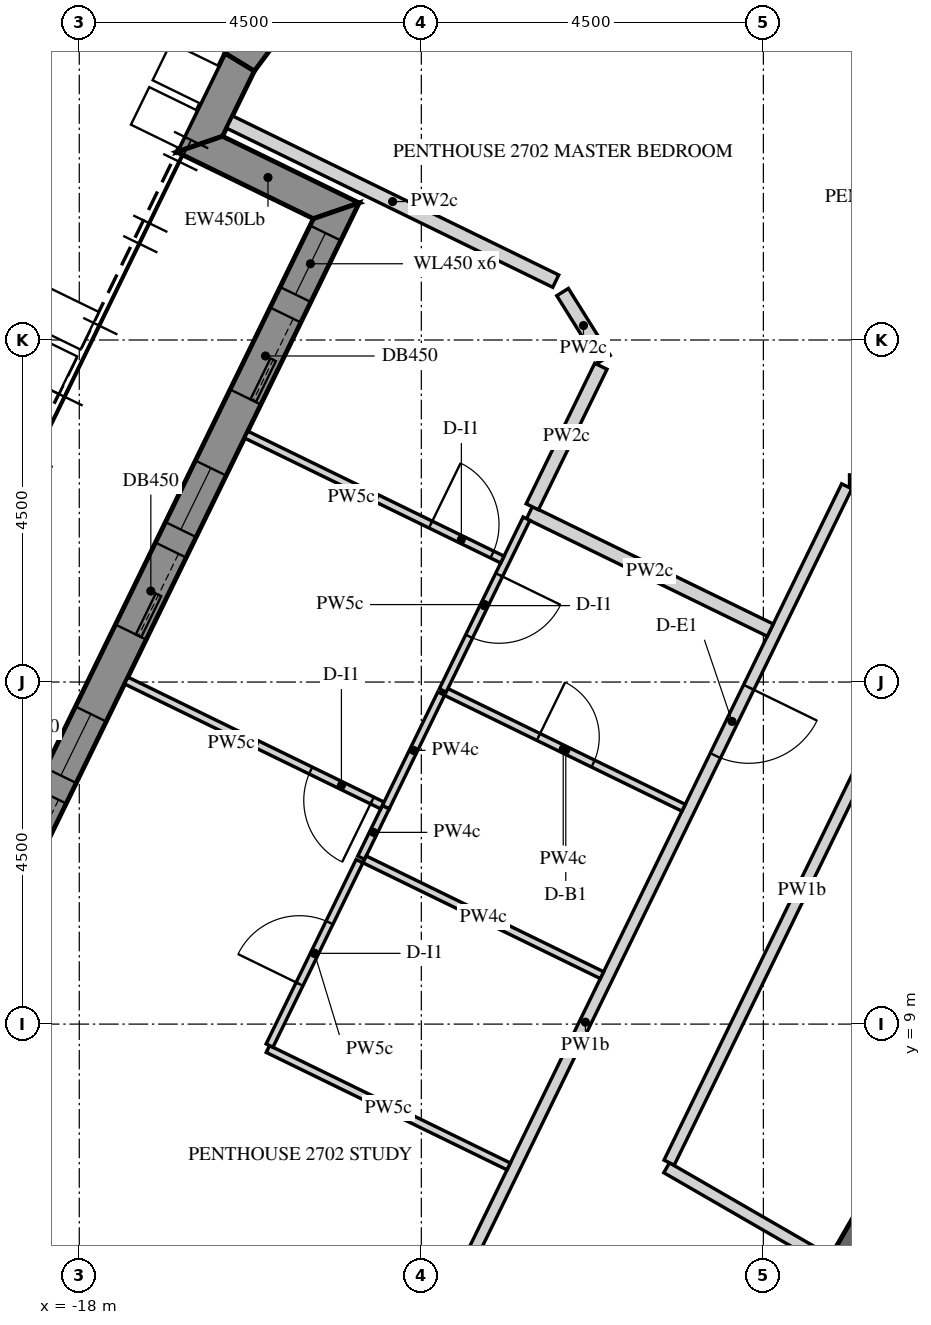
"""IFC4 building model, lengths in metres.
Left out: names, types, materials, properties, quantities, classifications, styles, units other than length and angle.
Written with IfcOpenShell. Run it as: python <this file> out.ifc"""

import sys

from ifc_helpers import new_model, si_unit, direction, frame, frame_2d, origin, place, context, subcontext, project, spatial, polyline, rectangle, outline, extrude, element, fill, save


model = new_model("IFC4")
c1 = context("Model", 3, precision=1e-05, world=origin(), true_north=direction((0.0, 1.0)))
c2 = subcontext(c1, "Body", "Model", "MODEL_VIEW")
j1 = project(units=[si_unit("LENGTHUNIT", "METRE"), si_unit("PLANEANGLEUNIT", "RADIAN")], contexts=[c1])
p1 = place(None, origin())
s1 = spatial("IfcSite", under=j1, at=p1, CompositionType="ELEMENT")
p2 = place(p1, origin())
s2 = spatial("IfcBuilding", under=s1, at=p2, CompositionType="ELEMENT")
p3 = place(p2, frame((0.0, 0.0, 349.5)))
s3 = spatial("IfcBuildingStorey", under=s2, at=p3, CompositionType="ELEMENT", Elevation=349.5)
p4 = place(p3, frame((-15.056, 22.776, 0.0), z_axis=(0.0, 0.0, 1.0), x_axis=(-0.597089203515, -0.802174845682, 0.0)))
e1 = element("IfcWall", 1, at=p4, inside=s3, PredefinedType="SOLIDWALL", context=c2, shape_type="SweptSolid", body=[
    extrude(outline(polyline([(-0.042, -0.225), (1.418, -0.225), (1.376, 0.225), (0.042, 0.225), (-0.042, -0.225)])), origin(), (0.0, 0.0, 1.0), 3.75),
])
p5 = place(p3, frame((-15.89, 21.655, 0.0), z_axis=(0.0, 0.0, 1.0), x_axis=(-0.438319390103, -0.898819287877, 0.0)))
e2 = element("IfcWall", 2, at=p5, inside=s3, PredefinedType="SOLIDWALL", context=c2, shape_type="SweptSolid", body=[
    extrude(outline(polyline([(-0.021, -0.225), (1.425, -0.225), (0.975, 0.225), (0.021, 0.225), (-0.021, -0.225)])), origin(), (0.0, 0.0, 1.0), 3.75),
])
p6 = place(p3, frame((-16.416, 20.576, 0.0), z_axis=(0.0, 0.0, 1.0), x_axis=(0.898730898244, -0.438500595829, 0.0)))
e3 = element("IfcWall", 3, at=p6, inside=s3, PredefinedType="SOLIDWALL", context=c2, shape_type="SweptSolid", body=[
    extrude(outline(polyline([(-0.225, -0.225), (1.775, -0.225), (2.225, 0.225), (0.225, 0.225), (-0.225, -0.225)])), origin(), (0.0, 0.0, 1.0), 3.75),
])
p7 = place(p3, frame((-14.619, 19.699, 0.0), z_axis=(0.0, 0.0, 1.0), x_axis=(-0.438373747484, -0.898792777851, 0.0)))
e4 = element("IfcWall", 4, at=p7, inside=s3, PredefinedType="SOLIDWALL", context=c2, shape_type="SweptSolid", body=[
    extrude(outline(polyline([(0.225, -0.225), (20.506, -0.225), (20.957, 0.225), (-0.225, 0.225), (0.225, -0.225)])), origin(), (0.0, 0.0, 1.0), 3.75),
])
p8 = place(p7, frame((0.325, 0.0, 0.9)))
e5 = element("IfcOpeningElement", 5, at=p8, cuts=e4, PredefinedType="OPENING", context=c2, shape_type="SweptSolid", body=[
    extrude(rectangle(XDim=0.9, YDim=1.5, at=frame_2d((0.45, 0.75))), frame((0.0, 0.235, 0.0), z_axis=(0.0, -1.0, 0.0), x_axis=(1.0, 0.0, 0.0)), (0.0, 0.0, 1.0), 0.47),
])
p9 = place(p7, frame((1.525, 0.0, 0.0)))
e6 = element("IfcOpeningElement", 6, at=p9, cuts=e4, PredefinedType="OPENING", context=c2, shape_type="SweptSolid", body=[
    extrude(rectangle(XDim=1.2, YDim=2.4, at=frame_2d((0.6, 1.2))), frame((0.0, 0.235, 0.0), z_axis=(0.0, -1.0, 0.0), x_axis=(1.0, 0.0, 0.0)), (0.0, 0.0, 1.0), 0.47),
])
p10 = place(p7, frame((3.766, 0.0, 0.9)))
e7 = element("IfcOpeningElement", 7, at=p10, cuts=e4, PredefinedType="OPENING", context=c2, shape_type="SweptSolid", body=[
    extrude(rectangle(XDim=0.9, YDim=1.5, at=frame_2d((0.45, 0.75))), frame((0.0, 0.235, 0.0), z_axis=(0.0, -1.0, 0.0), x_axis=(1.0, 0.0, 0.0)), (0.0, 0.0, 1.0), 0.47),
])
p11 = place(p7, frame((4.966, 0.0, 0.0)))
e8 = element("IfcOpeningElement", 8, at=p11, cuts=e4, PredefinedType="OPENING", context=c2, shape_type="SweptSolid", body=[
    extrude(rectangle(XDim=1.2, YDim=2.4, at=frame_2d((0.6, 1.2))), frame((0.0, 0.235, 0.0), z_axis=(0.0, -1.0, 0.0), x_axis=(1.0, 0.0, 0.0)), (0.0, 0.0, 1.0), 0.47),
])
p12 = place(p7, frame((7.366, 0.0, 0.9)))
e9 = element("IfcOpeningElement", 9, at=p12, cuts=e4, PredefinedType="OPENING", context=c2, shape_type="SweptSolid", body=[
    extrude(rectangle(XDim=0.9, YDim=1.5, at=frame_2d((0.45, 0.75))), frame((0.0, 0.235, 0.0), z_axis=(0.0, -1.0, 0.0), x_axis=(1.0, 0.0, 0.0)), (0.0, 0.0, 1.0), 0.47),
])
p13 = place(p7, frame((8.566, 0.0, 0.0)))
e10 = element("IfcOpeningElement", 10, at=p13, cuts=e4, PredefinedType="OPENING", context=c2, shape_type="SweptSolid", body=[
    extrude(rectangle(XDim=1.2, YDim=2.4, at=frame_2d((0.6, 1.2))), frame((0.0, 0.235, 0.0), z_axis=(0.0, -1.0, 0.0), x_axis=(1.0, 0.0, 0.0)), (0.0, 0.0, 1.0), 0.47),
])
p14 = place(p7, frame((10.966, 0.0, 0.9)))
e11 = element("IfcOpeningElement", 11, at=p14, cuts=e4, PredefinedType="OPENING", context=c2, shape_type="SweptSolid", body=[
    extrude(rectangle(XDim=0.9, YDim=1.5, at=frame_2d((0.45, 0.75))), frame((0.0, 0.235, 0.0), z_axis=(0.0, -1.0, 0.0), x_axis=(1.0, 0.0, 0.0)), (0.0, 0.0, 1.0), 0.47),
])
p15 = place(p7, frame((12.166, 0.0, 0.0)))
e12 = element("IfcOpeningElement", 12, at=p15, cuts=e4, PredefinedType="OPENING", context=c2, shape_type="SweptSolid", body=[
    extrude(rectangle(XDim=1.2, YDim=2.4, at=frame_2d((0.6, 1.2))), frame((0.0, 0.235, 0.0), z_axis=(0.0, -1.0, 0.0), x_axis=(1.0, 0.0, 0.0)), (0.0, 0.0, 1.0), 0.47),
])
p16 = place(p7, frame((14.566, 0.0, 0.9)))
e13 = element("IfcOpeningElement", 13, at=p16, cuts=e4, PredefinedType="OPENING", context=c2, shape_type="SweptSolid", body=[
    extrude(rectangle(XDim=0.9, YDim=1.5, at=frame_2d((0.45, 0.75))), frame((0.0, 0.235, 0.0), z_axis=(0.0, -1.0, 0.0), x_axis=(1.0, 0.0, 0.0)), (0.0, 0.0, 1.0), 0.47),
])
p17 = place(p7, frame((15.766, 0.0, 0.0)))
e14 = element("IfcOpeningElement", 14, at=p17, cuts=e4, PredefinedType="OPENING", context=c2, shape_type="SweptSolid", body=[
    extrude(rectangle(XDim=1.2, YDim=2.4, at=frame_2d((0.6, 1.2))), frame((0.0, 0.235, 0.0), z_axis=(0.0, -1.0, 0.0), x_axis=(1.0, 0.0, 0.0)), (0.0, 0.0, 1.0), 0.47),
])
p18 = place(p7, frame((18.007, 0.0, 0.9)))
e15 = element("IfcOpeningElement", 15, at=p18, cuts=e4, PredefinedType="OPENING", context=c2, shape_type="SweptSolid", body=[
    extrude(rectangle(XDim=0.9, YDim=1.5, at=frame_2d((0.45, 0.75))), frame((0.0, 0.235, 0.0), z_axis=(0.0, -1.0, 0.0), x_axis=(1.0, 0.0, 0.0)), (0.0, 0.0, 1.0), 0.47),
])
p19 = place(p7, frame((19.207, 0.0, 0.0)))
e16 = element("IfcOpeningElement", 16, at=p19, cuts=e4, PredefinedType="OPENING", context=c2, shape_type="SweptSolid", body=[
    extrude(rectangle(XDim=1.2, YDim=2.4, at=frame_2d((0.6, 1.2))), frame((0.0, 0.235, 0.0), z_axis=(0.0, -1.0, 0.0), x_axis=(1.0, 0.0, 0.0)), (0.0, 0.0, 1.0), 0.47),
])
p20 = place(p3, frame((-5.673, 9.825, 0.0), z_axis=(0.0, 0.0, 1.0), x_axis=(-0.499995046907, -0.866028263435, 0.0)))
e17 = element("IfcWall", 17, at=p20, inside=s3, PredefinedType="SHEAR", context=c2, shape_type="SweptSolid", body=[
    extrude(outline(polyline([(-0.101, -0.175), (11.446, -0.175), (11.244, 0.175), (0.101, 0.175), (-0.101, -0.175)])), origin(), (0.0, 0.0, 1.0), 3.75),
])
p21 = place(p20, frame((4.801, 0.0, 0.0)))
e18 = element("IfcOpeningElement", 18, at=p21, cuts=e17, PredefinedType="OPENING", context=c2, shape_type="SweptSolid", body=[
    extrude(rectangle(XDim=1.8, YDim=2.4, at=frame_2d((0.9, 1.2))), frame((0.0, 0.185, 0.0), z_axis=(0.0, -1.0, 0.0), x_axis=(1.0, 0.0, 0.0)), (0.0, 0.0, 1.0), 0.37),
])
p22 = place(p3, frame((6.1, 16.15, 0.0), z_axis=(0.0, 0.0, 1.0), x_axis=(-1.0, 0.0, 0.0)))
e19 = element("IfcWall", 19, at=p22, inside=s3, PredefinedType="PARTITIONING", context=c2, shape_type="SweptSolid", body=[
    extrude(rectangle(XDim=13.966, YDim=0.15, at=frame_2d((6.983, 0.0))), origin(), (0.0, 0.0, 1.0), 2.82),
])
p23 = place(p22, frame((0.925, 0.0, 0.0)))
e20 = element("IfcOpeningElement", 20, at=p23, cuts=e19, PredefinedType="OPENING", context=c2, shape_type="SweptSolid", body=[
    extrude(rectangle(XDim=1.0, YDim=2.1, at=frame_2d((0.5, 1.05))), frame((0.0, 0.085, 0.0), z_axis=(0.0, -1.0, 0.0), x_axis=(1.0, 0.0, 0.0)), (0.0, 0.0, 1.0), 0.17),
])
p24 = place(p3, frame((-7.903, 16.075, 0.0), z_axis=(0.0, 0.0, 1.0), x_axis=(-0.438364761272, -0.898797160696, 0.0)))
e21 = element("IfcWall", 21, at=p24, inside=s3, PredefinedType="PARTITIONING", context=c2, shape_type="SweptSolid", body=[
    extrude(rectangle(XDim=15.688, YDim=0.15, at=frame_2d((7.844, 0.0))), origin(), (0.0, 0.0, 1.0), 2.82),
])
p25 = place(p24, frame((2.942, 0.0, 0.0)))
e22 = element("IfcOpeningElement", 22, at=p25, cuts=e21, PredefinedType="OPENING", context=c2, shape_type="SweptSolid", body=[
    extrude(rectangle(XDim=1.0, YDim=2.1, at=frame_2d((0.5, 1.05))), frame((0.0, 0.085, 0.0), z_axis=(0.0, -1.0, 0.0), x_axis=(1.0, 0.0, 0.0)), (0.0, 0.0, 1.0), 0.17),
])
p26 = place(p3, frame((-8.15, 5.884, 0.0), z_axis=(0.0, 0.0, 1.0), x_axis=(-0.866009790468, 0.500027042082, 0.0)))
e23 = element("IfcWall", 23, at=p26, inside=s3, PredefinedType="PARTITIONING", context=c2, shape_type="SweptSolid", body=[
    extrude(rectangle(XDim=2.451, YDim=0.15, at=frame_2d((1.226, 0.0))), origin(), (0.0, 0.0, 1.0), 2.82),
])
p27 = place(p3, frame((-10.24, 7.178, 0.0), z_axis=(0.0, 0.0, 1.0), x_axis=(0.438356120288, 0.898801375058, 0.0)))
e24 = element("IfcWall", 24, at=p27, inside=s3, PredefinedType="PARTITIONING", context=c2, shape_type="SweptSolid", body=[
    extrude(rectangle(XDim=7.98, YDim=0.15, at=frame_2d((3.99, 0.0))), origin(), (0.0, 0.0, 1.0), 2.82),
])
p28 = place(p3, frame((-12.078, 15.728, 0.0), z_axis=(0.0, 0.0, 1.0), x_axis=(0.898802391248, -0.438354036696, 0.0)))
e25 = element("IfcWall", 25, at=p28, inside=s3, PredefinedType="PARTITIONING", context=c2, shape_type="SweptSolid", body=[
    extrude(rectangle(XDim=3.525, YDim=0.18, at=frame_2d((1.762, 0.0))), origin(), (0.0, 0.0, 1.0), 2.82),
])
p29 = place(p3, frame((-16.024, 20.868, 0.0), z_axis=(0.0, 0.0, 1.0), x_axis=(0.898790554329, -0.438378306317, 0.0)))
e26 = element("IfcWall", 26, at=p29, inside=s3, PredefinedType="PARTITIONING", context=c2, shape_type="SweptSolid", body=[
    extrude(rectangle(XDim=4.776, YDim=0.18, at=frame_2d((2.388, 0.0))), origin(), (0.0, 0.0, 1.0), 2.82),
])
p30 = place(p3, frame((-11.642, 18.63, 0.0), z_axis=(0.0, 0.0, 1.0), x_axis=(0.530041214548, -0.847971880949, 0.0)))
e27 = element("IfcWall", 27, at=p30, inside=s3, PredefinedType="PARTITIONING", context=c2, shape_type="SweptSolid", body=[
    extrude(rectangle(XDim=1.038, YDim=0.18, at=frame_2d((0.519, 0.0))), origin(), (0.0, 0.0, 1.0), 2.82),
])
p31 = place(p3, frame((-11.138, 17.655, 0.0), z_axis=(0.0, 0.0, 1.0), x_axis=(-0.438409602339, -0.898775289256, 0.0)))
e28 = element("IfcWall", 28, at=p31, inside=s3, PredefinedType="PARTITIONING", context=c2, shape_type="SweptSolid", body=[
    extrude(rectangle(XDim=2.057, YDim=0.18, at=frame_2d((1.029, 0.0))), origin(), (0.0, 0.0, 1.0), 2.82),
])
p32 = place(p3, frame((-14.291, 11.189, 0.0), z_axis=(0.0, 0.0, 1.0), x_axis=(0.438105837585, 0.898923397779, 0.0)))
e29 = element("IfcWall", 29, at=p32, inside=s3, PredefinedType="PARTITIONING", context=c2, shape_type="SweptSolid", body=[
    extrude(rectangle(XDim=0.742, YDim=0.1, at=frame_2d((0.371, 0.0))), origin(), (0.0, 0.0, 1.0), 2.82),
])
p33 = place(p3, frame((-14.012, 11.876, 0.0), z_axis=(0.0, 0.0, 1.0), x_axis=(-0.898810362659, 0.438337691713, 0.0)))
e30 = element("IfcWall", 30, at=p33, inside=s3, PredefinedType="PARTITIONING", context=c2, shape_type="SweptSolid", body=[
    extrude(rectangle(XDim=3.75, YDim=0.1, at=frame_2d((1.875, 0.0))), origin(), (0.0, 0.0, 1.0), 2.82),
])
p34 = place(p33, frame((0.15, 0.0, 0.0)))
e31 = element("IfcOpeningElement", 31, at=p34, cuts=e30, PredefinedType="OPENING", context=c2, shape_type="SweptSolid", body=[
    extrude(rectangle(XDim=0.9, YDim=2.1, at=frame_2d((0.45, 1.05))), frame((0.0, 0.06, 0.0), z_axis=(0.0, -1.0, 0.0), x_axis=(1.0, 0.0, 0.0)), (0.0, 0.0, 1.0), 0.12),
])
p35 = place(p3, frame((-12.351, 7.127, 0.0), z_axis=(0.0, 0.0, 1.0), x_axis=(-0.898802391248, 0.438354036696, 0.0)))
e32 = element("IfcWall", 32, at=p35, inside=s3, PredefinedType="PARTITIONING", context=c2, shape_type="SweptSolid", body=[
    extrude(rectangle(XDim=3.525, YDim=0.1, at=frame_2d((1.762, 0.0))), origin(), (0.0, 0.0, 1.0), 2.82),
])
p36 = place(p3, frame((-15.497, 8.718, 0.0), z_axis=(0.0, 0.0, 1.0), x_axis=(0.438366623032, 0.898796252669, 0.0)))
e33 = element("IfcWall", 33, at=p36, inside=s3, PredefinedType="PARTITIONING", context=c2, shape_type="SweptSolid", body=[
    extrude(rectangle(XDim=2.7, YDim=0.1, at=frame_2d((1.35, 0.0))), origin(), (0.0, 0.0, 1.0), 2.82),
])
p37 = place(p36, frame((0.9, 0.0, 0.0)))
e34 = element("IfcOpeningElement", 34, at=p37, cuts=e33, PredefinedType="OPENING", context=c2, shape_type="SweptSolid", body=[
    extrude(rectangle(XDim=0.9, YDim=2.1, at=frame_2d((0.45, 1.05))), frame((0.0, 0.06, 0.0), z_axis=(0.0, -1.0, 0.0), x_axis=(1.0, 0.0, 0.0)), (0.0, 0.0, 1.0), 0.12),
])
p38 = place(p3, frame((-13.217, 13.391, 0.0), z_axis=(0.0, 0.0, 1.0), x_axis=(0.898775101867, -0.438409986501, 0.0)))
e35 = element("IfcWall", 35, at=p38, inside=s3, PredefinedType="PARTITIONING", context=c2, shape_type="SweptSolid", body=[
    extrude(rectangle(XDim=3.525, YDim=0.1, at=frame_2d((1.763, 0.0))), origin(), (0.0, 0.0, 1.0), 2.82),
])
p39 = place(p38, frame((1.4, 0.0, 0.0)))
e36 = element("IfcOpeningElement", 36, at=p39, cuts=e35, PredefinedType="OPENING", context=c2, shape_type="SweptSolid", body=[
    extrude(rectangle(XDim=0.8, YDim=2.1, at=frame_2d((0.4, 1.05))), frame((0.0, 0.06, 0.0), z_axis=(0.0, -1.0, 0.0), x_axis=(1.0, 0.0, 0.0)), (0.0, 0.0, 1.0), 0.12),
])
p40 = place(p3, frame((-12.116, 15.649, 0.0), z_axis=(0.0, 0.0, 1.0), x_axis=(-0.438335623405, -0.898811371342, 0.0)))
e37 = element("IfcWall", 37, at=p40, inside=s3, PredefinedType="PARTITIONING", context=c2, shape_type="SweptSolid", body=[
    extrude(rectangle(XDim=2.514, YDim=0.1, at=frame_2d((1.257, 0.0))), origin(), (0.0, 0.0, 1.0), 2.82),
])
p41 = place(p40, frame((0.822, 0.0, 0.0)))
e38 = element("IfcOpeningElement", 38, at=p41, cuts=e37, PredefinedType="OPENING", context=c2, shape_type="SweptSolid", body=[
    extrude(rectangle(XDim=0.9, YDim=2.1, at=frame_2d((0.45, 1.05))), frame((0.0, 0.06, 0.0), z_axis=(0.0, -1.0, 0.0), x_axis=(1.0, 0.0, 0.0)), (0.0, 0.0, 1.0), 0.12),
])
p42 = place(p3, frame((-13.238, 13.348, 0.0), z_axis=(0.0, 0.0, 1.0), x_axis=(-0.438380229518, -0.898789616299, 0.0)))
e39 = element("IfcWall", 39, at=p42, inside=s3, PredefinedType="PARTITIONING", context=c2, shape_type="SweptSolid", body=[
    extrude(rectangle(XDim=1.662, YDim=0.1, at=frame_2d((0.831, 0.0))), origin(), (0.0, 0.0, 1.0), 2.82),
])
p43 = place(p3, frame((-14.246, 11.167, 0.0), z_axis=(0.0, 0.0, 1.0), x_axis=(0.89880963085, -0.438339192283, 0.0)))
e40 = element("IfcWall", 40, at=p43, inside=s3, PredefinedType="PARTITIONING", context=c2, shape_type="SweptSolid", body=[
    extrude(rectangle(XDim=3.475, YDim=0.1, at=frame_2d((1.737, 0.0))), origin(), (0.0, 0.0, 1.0), 2.82),
])
p44 = place(p3, frame((-15.804, 16.756, 0.0), z_axis=(0.0, 0.0, 1.0), x_axis=(0.89878471246, -0.438390283479, 0.0)))
e41 = element("IfcWall", 41, at=p44, inside=s3, PredefinedType="PARTITIONING", context=c2, shape_type="SweptSolid", body=[
    extrude(rectangle(XDim=3.75, YDim=0.1, at=frame_2d((1.875, 0.0))), origin(), (0.0, 0.0, 1.0), 2.82),
])
p45 = place(p44, frame((2.7, 0.0, 0.0)))
e42 = element("IfcOpeningElement", 42, at=p45, cuts=e41, PredefinedType="OPENING", context=c2, shape_type="SweptSolid", body=[
    extrude(rectangle(XDim=0.9, YDim=2.1, at=frame_2d((0.45, 1.05))), frame((0.0, 0.06, 0.0), z_axis=(0.0, -1.0, 0.0), x_axis=(1.0, 0.0, 0.0)), (0.0, 0.0, 1.0), 0.12),
])
p46 = place(p8, frame((0.0, 0.155, 0.0)))
e43 = element("IfcWindow", 43, at=p46, inside=s3, PartitioningType="SINGLE_PANEL", PredefinedType="WINDOW", context=c2, shape_type="SweptSolid", body=[
    extrude(rectangle(XDim=0.9, YDim=1.5, at=frame_2d((0.45, 0.75))), frame((0.0, 0.03, 0.0), z_axis=(0.0, -1.0, 0.0), x_axis=(1.0, 0.0, 0.0)), (0.0, 0.0, 1.0), 0.06),
])
fill(e5, e43)
p47 = place(p9, frame((0.0, 0.15, 0.0)))
e44 = element("IfcDoor", 44, at=p47, inside=s3, OperationType="SLIDING_TO_LEFT", PredefinedType="DOOR", context=c2, shape_type="SweptSolid", body=[
    extrude(rectangle(XDim=1.2, YDim=2.4, at=frame_2d((0.6, 1.2))), frame((0.0, 0.025, 0.0), z_axis=(0.0, -1.0, 0.0), x_axis=(1.0, 0.0, 0.0)), (0.0, 0.0, 1.0), 0.05),
])
fill(e6, e44)
p48 = place(p10, frame((0.0, 0.155, 0.0)))
e45 = element("IfcWindow", 45, at=p48, inside=s3, PartitioningType="SINGLE_PANEL", PredefinedType="WINDOW", context=c2, shape_type="SweptSolid", body=[
    extrude(rectangle(XDim=0.9, YDim=1.5, at=frame_2d((0.45, 0.75))), frame((0.0, 0.03, 0.0), z_axis=(0.0, -1.0, 0.0), x_axis=(1.0, 0.0, 0.0)), (0.0, 0.0, 1.0), 0.06),
])
fill(e7, e45)
p49 = place(p11, frame((0.0, 0.15, 0.0)))
e46 = element("IfcDoor", 46, at=p49, inside=s3, OperationType="SLIDING_TO_LEFT", PredefinedType="DOOR", context=c2, shape_type="SweptSolid", body=[
    extrude(rectangle(XDim=1.2, YDim=2.4, at=frame_2d((0.6, 1.2))), frame((0.0, 0.025, 0.0), z_axis=(0.0, -1.0, 0.0), x_axis=(1.0, 0.0, 0.0)), (0.0, 0.0, 1.0), 0.05),
])
fill(e8, e46)
p50 = place(p12, frame((0.0, 0.155, 0.0)))
e47 = element("IfcWindow", 47, at=p50, inside=s3, PartitioningType="SINGLE_PANEL", PredefinedType="WINDOW", context=c2, shape_type="SweptSolid", body=[
    extrude(rectangle(XDim=0.9, YDim=1.5, at=frame_2d((0.45, 0.75))), frame((0.0, 0.03, 0.0), z_axis=(0.0, -1.0, 0.0), x_axis=(1.0, 0.0, 0.0)), (0.0, 0.0, 1.0), 0.06),
])
fill(e9, e47)
p51 = place(p13, frame((0.0, 0.15, 0.0)))
e48 = element("IfcDoor", 48, at=p51, inside=s3, OperationType="SLIDING_TO_LEFT", PredefinedType="DOOR", context=c2, shape_type="SweptSolid", body=[
    extrude(rectangle(XDim=1.2, YDim=2.4, at=frame_2d((0.6, 1.2))), frame((0.0, 0.025, 0.0), z_axis=(0.0, -1.0, 0.0), x_axis=(1.0, 0.0, 0.0)), (0.0, 0.0, 1.0), 0.05),
])
fill(e10, e48)
p52 = place(p25, origin())
e49 = element("IfcDoor", 49, at=p52, inside=s3, OperationType="SINGLE_SWING_LEFT", PredefinedType="DOOR", context=c2, shape_type="SweptSolid", body=[
    extrude(rectangle(XDim=1.0, YDim=2.1, at=frame_2d((0.5, 1.05))), frame((0.0, 0.025, 0.0), z_axis=(0.0, -1.0, 0.0), x_axis=(1.0, 0.0, 0.0)), (0.0, 0.0, 1.0), 0.05),
])
fill(e22, e49)
p53 = place(p39, origin())
e50 = element("IfcDoor", 50, at=p53, inside=s3, OperationType="SINGLE_SWING_LEFT", PredefinedType="DOOR", context=c2, shape_type="SweptSolid", body=[
    extrude(rectangle(XDim=0.8, YDim=2.1, at=frame_2d((0.4, 1.05))), frame((0.0, 0.025, 0.0), z_axis=(0.0, -1.0, 0.0), x_axis=(1.0, 0.0, 0.0)), (0.0, 0.0, 1.0), 0.05),
])
fill(e36, e50)
p54 = place(p41, origin())
e51 = element("IfcDoor", 51, at=p54, inside=s3, OperationType="SINGLE_SWING_LEFT", PredefinedType="DOOR", context=c2, shape_type="SweptSolid", body=[
    extrude(rectangle(XDim=0.9, YDim=2.1, at=frame_2d((0.45, 1.05))), frame((0.0, 0.025, 0.0), z_axis=(0.0, -1.0, 0.0), x_axis=(1.0, 0.0, 0.0)), (0.0, 0.0, 1.0), 0.05),
])
fill(e38, e51)
p55 = place(p45, origin())
e52 = element("IfcDoor", 52, at=p55, inside=s3, OperationType="SINGLE_SWING_RIGHT", PredefinedType="DOOR", context=c2, shape_type="SweptSolid", body=[
    extrude(rectangle(XDim=0.9, YDim=2.1, at=frame_2d((0.45, 1.05))), frame((0.0, 0.025, 0.0), z_axis=(0.0, -1.0, 0.0), x_axis=(1.0, 0.0, 0.0)), (0.0, 0.0, 1.0), 0.05),
])
fill(e42, e52)
p56 = place(p34, origin())
e53 = element("IfcDoor", 53, at=p56, inside=s3, OperationType="SINGLE_SWING_RIGHT", PredefinedType="DOOR", context=c2, shape_type="SweptSolid", body=[
    extrude(rectangle(XDim=0.9, YDim=2.1, at=frame_2d((0.45, 1.05))), frame((0.0, 0.025, 0.0), z_axis=(0.0, -1.0, 0.0), x_axis=(1.0, 0.0, 0.0)), (0.0, 0.0, 1.0), 0.05),
])
fill(e31, e53)
p57 = place(p37, origin())
e54 = element("IfcDoor", 54, at=p57, inside=s3, OperationType="SINGLE_SWING_RIGHT", PredefinedType="DOOR", context=c2, shape_type="SweptSolid", body=[
    extrude(rectangle(XDim=0.9, YDim=2.1, at=frame_2d((0.45, 1.05))), frame((0.0, 0.025, 0.0), z_axis=(0.0, -1.0, 0.0), x_axis=(1.0, 0.0, 0.0)), (0.0, 0.0, 1.0), 0.05),
])
fill(e34, e54)
save(model, sys.argv[1])
